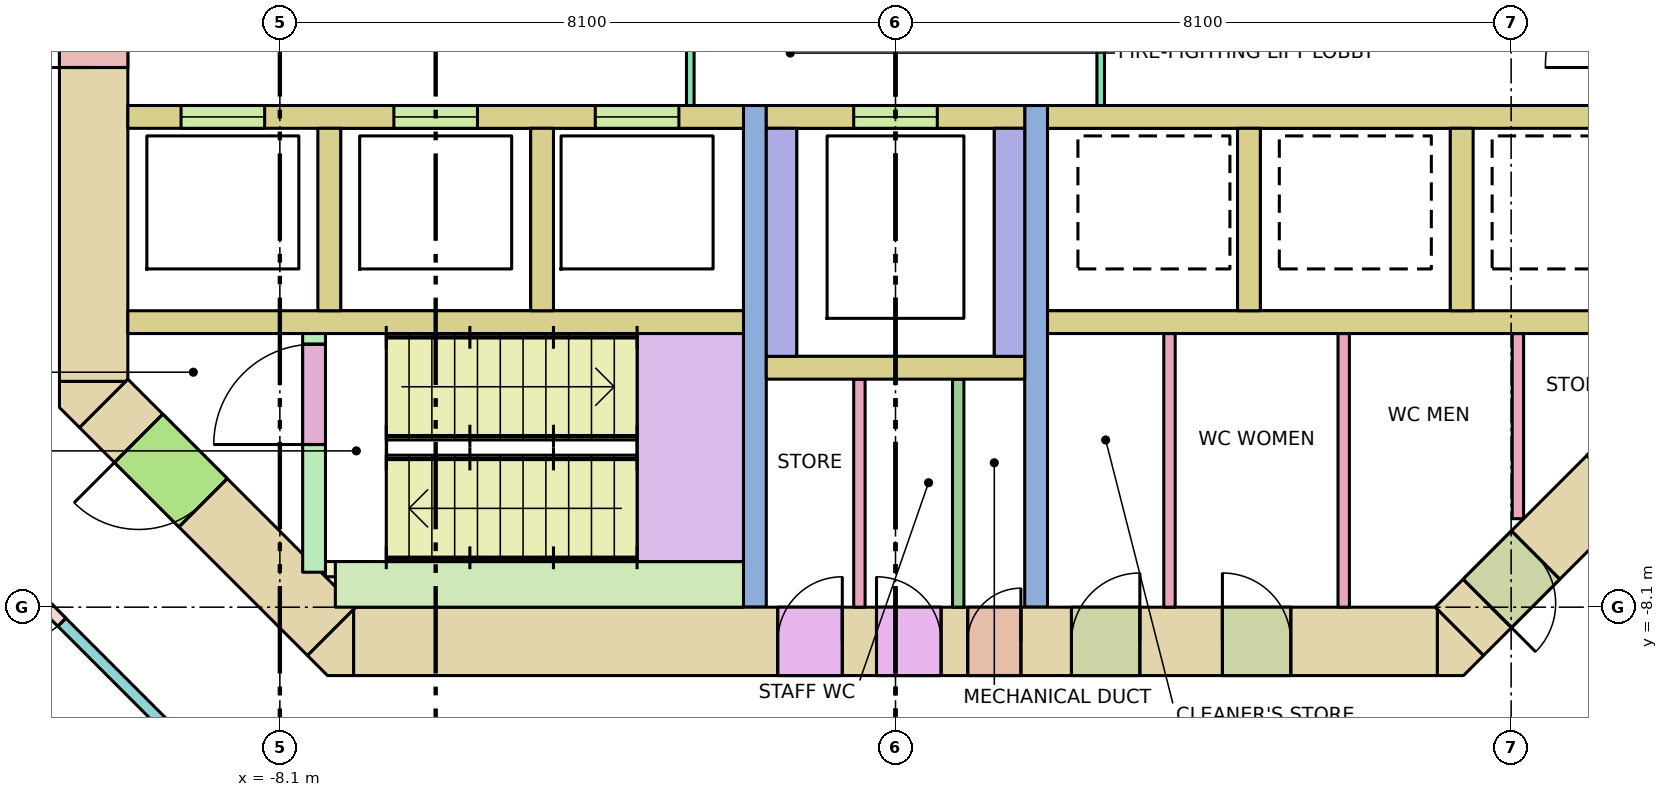
"""IFC4 building model, lengths in metres.
Left out: names, types, materials, properties, quantities, classifications, styles, units other than length and angle.
Written with IfcOpenShell. Run it as: python <this file> out.ifc"""

import sys

from ifc_helpers import new_model, si_unit, direction, frame, frame_2d, origin, place, context, subcontext, project, spatial, polyline, rectangle, outline, extrude, element, fill, save


model = new_model("IFC4")
c1 = context("Model", 3, precision=1e-05, world=origin(), true_north=direction((0.0, 1.0)))
c2 = subcontext(c1, "Body", "Model", "MODEL_VIEW")
j1 = project(units=[si_unit("LENGTHUNIT", "METRE"), si_unit("PLANEANGLEUNIT", "RADIAN")], contexts=[c1])
p1 = place(None, origin())
s1 = spatial("IfcSite", under=j1, at=p1, CompositionType="ELEMENT")
p2 = place(p1, origin())
s2 = spatial("IfcBuilding", under=s1, at=p2, CompositionType="ELEMENT")
p3 = place(p2, frame((0.0, 0.0, 98.6)))
s3 = spatial("IfcBuildingStorey", under=s2, at=p3, CompositionType="ELEMENT", Elevation=98.6)
p4 = place(p3, frame((-7.13, -8.55, -0.28), z_axis=(0.0, 0.0, 1.0), x_axis=(1.0, 0.0, 0.0)))
e1 = element("IfcWall", 1, at=p4, inside=s3, PredefinedType="SHEAR", context=c2, shape_type="SweptSolid", body=[
    extrude(rectangle(XDim=14.26, YDim=0.9, at=frame_2d((7.13, 0.0))), origin(), (0.0, 0.0, 1.0), 4.0),
])
p5 = place(p4, frame((8.08, 0.0, 0.28)))
e2 = element("IfcOpeningElement", 2, at=p5, cuts=e1, PredefinedType="OPENING", context=c2, shape_type="SweptSolid", body=[
    extrude(rectangle(XDim=0.7, YDim=2.1, at=frame_2d((0.35, 1.05))), frame((0.0, 0.46, 0.0), z_axis=(0.0, -1.0, 0.0), x_axis=(1.0, 0.0, 0.0)), (0.0, 0.0, 1.0), 0.92),
])
p6 = place(p4, frame((5.58, 0.0, 0.28)))
e3 = element("IfcOpeningElement", 3, at=p6, cuts=e1, PredefinedType="OPENING", context=c2, shape_type="SweptSolid", body=[
    extrude(rectangle(XDim=0.85, YDim=2.1, at=frame_2d((0.425, 1.05))), frame((0.0, 0.46, 0.0), z_axis=(0.0, -1.0, 0.0), x_axis=(1.0, 0.0, 0.0)), (0.0, 0.0, 1.0), 0.92),
])
p7 = place(p4, frame((6.88, 0.0, 0.28)))
e4 = element("IfcOpeningElement", 4, at=p7, cuts=e1, PredefinedType="OPENING", context=c2, shape_type="SweptSolid", body=[
    extrude(rectangle(XDim=0.85, YDim=2.1, at=frame_2d((0.425, 1.05))), frame((0.0, 0.46, 0.0), z_axis=(0.0, -1.0, 0.0), x_axis=(1.0, 0.0, 0.0)), (0.0, 0.0, 1.0), 0.92),
])
p8 = place(p4, frame((9.445, 0.0, 0.28)))
e5 = element("IfcOpeningElement", 5, at=p8, cuts=e1, PredefinedType="OPENING", context=c2, shape_type="SweptSolid", body=[
    extrude(rectangle(XDim=0.9, YDim=2.1, at=frame_2d((0.45, 1.05))), frame((0.0, 0.46, 0.0), z_axis=(0.0, -1.0, 0.0), x_axis=(1.0, 0.0, 0.0)), (0.0, 0.0, 1.0), 0.92),
])
p9 = place(p4, frame((11.431, 0.0, 0.28)))
e6 = element("IfcOpeningElement", 6, at=p9, cuts=e1, PredefinedType="OPENING", context=c2, shape_type="SweptSolid", body=[
    extrude(rectangle(XDim=0.9, YDim=2.1, at=frame_2d((0.45, 1.05))), frame((0.0, 0.46, 0.0), z_axis=(0.0, -1.0, 0.0), x_axis=(1.0, 0.0, 0.0)), (0.0, 0.0, 1.0), 0.92),
])
p10 = place(p3, frame((-10.55, -5.13, -0.28), z_axis=(0.0, 0.0, 1.0), x_axis=(0.0, 1.0, 0.0)))
e7 = element("IfcWall", 7, at=p10, inside=s3, PredefinedType="SHEAR", context=c2, shape_type="SweptSolid", body=[
    extrude(rectangle(XDim=10.26, YDim=0.9, at=frame_2d((5.13, 0.0))), origin(), (0.0, 0.0, 1.0), 4.0),
])
p11 = place(p10, frame((4.13, 0.0, 0.28)))
e8 = element("IfcOpeningElement", 8, at=p11, cuts=e7, PredefinedType="OPENING", context=c2, shape_type="SweptSolid", body=[
    extrude(rectangle(XDim=2.0, YDim=2.1, at=frame_2d((1.0, 1.05))), frame((0.0, 0.46, 0.0), z_axis=(0.0, -1.0, 0.0), x_axis=(1.0, 0.0, 0.0)), (0.0, 0.0, 1.0), 0.92),
])
p12 = place(p3, frame((10.418, -5.418, -0.28), z_axis=(0.0, 0.0, 1.0), x_axis=(-0.707106781187, -0.707106781187, 0.0)))
e9 = element("IfcWall", 9, at=p12, inside=s3, PredefinedType="SHEAR", context=c2, shape_type="SweptSolid", body=[
    extrude(rectangle(XDim=4.243, YDim=0.9, at=frame_2d((2.121, 0.0))), origin(), (0.0, 0.0, 1.0), 4.0),
])
p13 = place(p12, frame((2.823, 0.0, 0.28)))
e10 = element("IfcOpeningElement", 10, at=p13, cuts=e9, PredefinedType="OPENING", context=c2, shape_type="SweptSolid", body=[
    extrude(rectangle(XDim=0.9, YDim=2.1, at=frame_2d((0.45, 1.05))), frame((0.0, 0.46, 0.0), z_axis=(0.0, -1.0, 0.0), x_axis=(1.0, 0.0, 0.0)), (0.0, 0.0, 1.0), 0.92),
])
p14 = place(p12, frame((0.52, 0.0, 0.28)))
e11 = element("IfcOpeningElement", 11, at=p14, cuts=e9, PredefinedType="OPENING", context=c2, shape_type="SweptSolid", body=[
    extrude(rectangle(XDim=0.9, YDim=2.1, at=frame_2d((0.45, 1.05))), frame((0.0, 0.46, 0.0), z_axis=(0.0, -1.0, 0.0), x_axis=(1.0, 0.0, 0.0)), (0.0, 0.0, 1.0), 0.92),
])
p15 = place(p3, frame((-7.418, -8.418, -0.28), z_axis=(0.0, 0.0, 1.0), x_axis=(-0.707106781187, 0.707106781187, 0.0)))
e12 = element("IfcWall", 12, at=p15, inside=s3, PredefinedType="SHEAR", context=c2, shape_type="SweptSolid", body=[
    extrude(rectangle(XDim=4.243, YDim=0.9, at=frame_2d((2.121, 0.0))), origin(), (0.0, 0.0, 1.0), 4.0),
])
p16 = place(p15, frame((2.393, 0.0, 0.28)))
e13 = element("IfcOpeningElement", 13, at=p16, cuts=e12, PredefinedType="OPENING", context=c2, shape_type="SweptSolid", body=[
    extrude(rectangle(XDim=1.2, YDim=2.1, at=frame_2d((0.6, 1.05))), frame((0.0, 0.46, 0.0), z_axis=(0.0, -1.0, 0.0), x_axis=(1.0, 0.0, 0.0)), (0.0, 0.0, 1.0), 0.92),
])
p17 = place(p3, frame((0.0, 0.0, -0.28)))
e14 = element("IfcWall", 14, at=p17, inside=s3, PredefinedType="SHEAR", context=c2, shape_type="SweptSolid", body=[
    extrude(outline(polyline([(-7.473, -9.0), (-7.736, -8.736), (-7.13, -8.13), (-7.13, -9.0), (-7.473, -9.0)])), origin(), (0.0, 0.0, 1.0), 4.0),
])
p18 = place(p3, frame((0.0, 0.0, -0.28)))
e15 = element("IfcWall", 15, at=p18, inside=s3, PredefinedType="SHEAR", context=c2, shape_type="SweptSolid", body=[
    extrude(outline(polyline([(7.473, -9.0), (7.13, -9.0), (7.13, -8.13), (7.736, -8.736), (7.473, -9.0)])), origin(), (0.0, 0.0, 1.0), 4.0),
])
p19 = place(p3, frame((0.0, 0.0, -0.28)))
e16 = element("IfcWall", 16, at=p19, inside=s3, PredefinedType="SHEAR", context=c2, shape_type="SweptSolid", body=[
    extrude(outline(polyline([(-11.0, -5.473), (-11.0, -5.13), (-10.13, -5.13), (-10.736, -5.736), (-11.0, -5.473)])), origin(), (0.0, 0.0, 1.0), 4.0),
])
for number, where, z_axis, x_axis in (
    (17, (-10.1, -4.35, 0.0), (0.0, 0.0, 1.0), (1.0, 0.0, 0.0)),
    (18, (2.0, -4.35, 0.0), (0.0, 0.0, 1.0), (1.0, 0.0, 0.0)),
):
    element("IfcWall", number, at=place(p3, frame(where, z_axis=z_axis, x_axis=x_axis)), inside=s3, PredefinedType="SOLIDWALL", context=c2, shape_type="SweptSolid", body=[
        extrude(rectangle(XDim=8.1, YDim=0.3, at=frame_2d((4.05, 0.0))), origin(), (0.0, 0.0, 1.0), 3.72),
    ])
p20 = place(p3, frame((-10.1, -1.65, 0.0), z_axis=(0.0, 0.0, 1.0), x_axis=(1.0, 0.0, 0.0)))
e19 = element("IfcWall", 19, at=p20, inside=s3, PredefinedType="SOLIDWALL", context=c2, shape_type="SweptSolid", body=[
    extrude(rectangle(XDim=8.1, YDim=0.3, at=frame_2d((4.05, 0.0))), origin(), (0.0, 0.0, 1.0), 3.72),
])
p21 = place(p20, frame((0.7, 0.0, 0.0)))
e20 = element("IfcOpeningElement", 20, at=p21, cuts=e19, PredefinedType="OPENING", context=c2, shape_type="SweptSolid", body=[
    extrude(rectangle(XDim=1.1, YDim=2.1, at=frame_2d((0.55, 1.05))), frame((0.0, 0.16, 0.0), z_axis=(0.0, -1.0, 0.0), x_axis=(1.0, 0.0, 0.0)), (0.0, 0.0, 1.0), 0.32),
])
p22 = place(p20, frame((3.5, 0.0, 0.0)))
e21 = element("IfcOpeningElement", 21, at=p22, cuts=e19, PredefinedType="OPENING", context=c2, shape_type="SweptSolid", body=[
    extrude(rectangle(XDim=1.1, YDim=2.1, at=frame_2d((0.55, 1.05))), frame((0.0, 0.16, 0.0), z_axis=(0.0, -1.0, 0.0), x_axis=(1.0, 0.0, 0.0)), (0.0, 0.0, 1.0), 0.32),
])
p23 = place(p20, frame((6.15, 0.0, 0.0)))
e22 = element("IfcOpeningElement", 22, at=p23, cuts=e19, PredefinedType="OPENING", context=c2, shape_type="SweptSolid", body=[
    extrude(rectangle(XDim=1.1, YDim=2.1, at=frame_2d((0.55, 1.05))), frame((0.0, 0.16, 0.0), z_axis=(0.0, -1.0, 0.0), x_axis=(1.0, 0.0, 0.0)), (0.0, 0.0, 1.0), 0.32),
])
p24 = place(p3, frame((2.0, -1.65, 0.0), z_axis=(0.0, 0.0, 1.0), x_axis=(1.0, 0.0, 0.0)))
e23 = element("IfcWall", 23, at=p24, inside=s3, PredefinedType="SOLIDWALL", context=c2, shape_type="SweptSolid", body=[
    extrude(rectangle(XDim=8.1, YDim=0.3, at=frame_2d((4.05, 0.0))), origin(), (0.0, 0.0, 1.0), 3.72),
])
for number, where, z_axis, x_axis in (
    (24, (-7.45, -4.2, 0.0), (0.0, 0.0, 1.0), (0.0, 1.0, 0.0)),
    (25, (-4.65, -4.2, 0.0), (0.0, 0.0, 1.0), (0.0, 1.0, 0.0)),
    (26, (4.65, -4.2, 0.0), (0.0, 0.0, 1.0), (0.0, 1.0, 0.0)),
    (27, (7.45, -4.2, 0.0), (0.0, 0.0, 1.0), (0.0, 1.0, 0.0)),
):
    element("IfcWall", number, at=place(p3, frame(where, z_axis=z_axis, x_axis=x_axis)), inside=s3, PredefinedType="SOLIDWALL", context=c2, shape_type="SweptSolid", body=[
        extrude(rectangle(XDim=2.4, YDim=0.3, at=frame_2d((1.2, 0.0))), origin(), (0.0, 0.0, 1.0), 3.72),
    ])
for number, where, z_axis, x_axis in (
    (28, (-1.85, -8.1, 0.0), (0.0, 0.0, 1.0), (0.0, 1.0, 0.0)),
    (29, (1.85, -8.1, 0.0), (0.0, 0.0, 1.0), (0.0, 1.0, 0.0)),
):
    element("IfcWall", number, at=place(p3, frame(where, z_axis=z_axis, x_axis=x_axis)), inside=s3, PredefinedType="SHEAR", context=c2, shape_type="SweptSolid", body=[
        extrude(rectangle(XDim=6.6, YDim=0.3, at=frame_2d((3.3, 0.0))), origin(), (0.0, 0.0, 1.0), 3.72),
    ])
p25 = place(p3, frame((-1.7, -1.65, 0.0), z_axis=(0.0, 0.0, 1.0), x_axis=(1.0, 0.0, 0.0)))
e30 = element("IfcWall", 30, at=p25, inside=s3, PredefinedType="SOLIDWALL", context=c2, shape_type="SweptSolid", body=[
    extrude(rectangle(XDim=3.4, YDim=0.3, at=frame_2d((1.7, 0.0))), origin(), (0.0, 0.0, 1.0), 3.72),
])
p26 = place(p25, frame((1.15, 0.0, 0.0)))
e31 = element("IfcOpeningElement", 31, at=p26, cuts=e30, PredefinedType="OPENING", context=c2, shape_type="SweptSolid", body=[
    extrude(rectangle(XDim=1.1, YDim=2.1, at=frame_2d((0.55, 1.05))), frame((0.0, 0.16, 0.0), z_axis=(0.0, -1.0, 0.0), x_axis=(1.0, 0.0, 0.0)), (0.0, 0.0, 1.0), 0.32),
])
for number, where, z_axis, x_axis in (
    (32, (-1.5, -4.8, 0.0), (0.0, 0.0, 1.0), (0.0, 1.0, 0.0)),
    (33, (1.5, -4.8, 0.0), (0.0, 0.0, 1.0), (0.0, 1.0, 0.0)),
):
    element("IfcWall", number, at=place(p3, frame(where, z_axis=z_axis, x_axis=x_axis)), inside=s3, PredefinedType="SOLIDWALL", context=c2, shape_type="SweptSolid", body=[
        extrude(rectangle(XDim=3.0, YDim=0.4, at=frame_2d((1.5, 0.0))), origin(), (0.0, 0.0, 1.0), 3.72),
    ])
p27 = place(p3, frame((-1.7, -4.95, 0.0), z_axis=(0.0, 0.0, 1.0), x_axis=(1.0, 0.0, 0.0)))
e34 = element("IfcWall", 34, at=p27, inside=s3, PredefinedType="SOLIDWALL", context=c2, shape_type="SweptSolid", body=[
    extrude(rectangle(XDim=3.4, YDim=0.3, at=frame_2d((1.7, 0.0))), origin(), (0.0, 0.0, 1.0), 3.72),
])
p28 = place(p3, frame((-7.65, -7.64, 0.0), z_axis=(0.0, 0.0, 1.0), x_axis=(0.0, 1.0, 0.0)))
e35 = element("IfcWall", 35, at=p28, inside=s3, PredefinedType="SHEAR", context=c2, shape_type="SweptSolid", body=[
    extrude(rectangle(XDim=3.14, YDim=0.3, at=frame_2d((1.57, 0.0))), origin(), (0.0, 0.0, 1.0), 3.72),
])
p29 = place(p28, frame((1.68, 0.0, 0.0)))
e36 = element("IfcOpeningElement", 36, at=p29, cuts=e35, PredefinedType="OPENING", context=c2, shape_type="SweptSolid", body=[
    extrude(rectangle(XDim=1.32, YDim=2.1, at=frame_2d((0.66, 1.05))), frame((0.0, 0.16, 0.0), z_axis=(0.0, -1.0, 0.0), x_axis=(1.0, 0.0, 0.0)), (0.0, 0.0, 1.0), 0.32),
])
p30 = place(p3, frame((-7.5, -7.6, 0.0), z_axis=(0.0, 0.0, 1.0), x_axis=(1.0, 0.0, 0.0)))
e37 = element("IfcWall", 37, at=p30, inside=s3, PredefinedType="SHEAR", context=c2, shape_type="SweptSolid", body=[
    extrude(rectangle(XDim=0.6, YDim=0.2, at=frame_2d((0.3, 0.0))), origin(), (0.0, 0.0, 1.0), 3.72),
])
p31 = place(p3, frame((-7.37, -7.8, 0.0), z_axis=(0.0, 0.0, 1.0), x_axis=(1.0, 0.0, 0.0)))
e38 = element("IfcWall", 38, at=p31, inside=s3, PredefinedType="SHEAR", context=c2, shape_type="SweptSolid", body=[
    extrude(rectangle(XDim=5.37, YDim=0.6, at=frame_2d((2.685, 0.0))), origin(), (0.0, 0.0, 1.0), 3.72),
])
p32 = place(p3, frame((-2.7, -1.5, 0.0), z_axis=(0.0, 0.0, 1.0), x_axis=(0.0, 1.0, 0.0)))
e39 = element("IfcWall", 39, at=p32, inside=s3, PredefinedType="PARTITIONING", context=c2, shape_type="SweptSolid", body=[
    extrude(rectangle(XDim=3.0, YDim=0.1, at=frame_2d((1.5, 0.0))), origin(), (0.0, 0.0, 1.0), 3.72),
])
p33 = place(p32, frame((0.9, 0.0, 0.0)))
e40 = element("IfcOpeningElement", 40, at=p33, cuts=e39, PredefinedType="OPENING", context=c2, shape_type="SweptSolid", body=[
    extrude(rectangle(XDim=1.2, YDim=2.1, at=frame_2d((0.6, 1.05))), frame((0.0, 0.06, 0.0), z_axis=(0.0, -1.0, 0.0), x_axis=(1.0, 0.0, 0.0)), (0.0, 0.0, 1.0), 0.12),
])
p34 = place(p3, frame((2.7, -1.5, 0.0), z_axis=(0.0, 0.0, 1.0), x_axis=(0.0, 1.0, 0.0)))
e41 = element("IfcWall", 41, at=p34, inside=s3, PredefinedType="PARTITIONING", context=c2, shape_type="SweptSolid", body=[
    extrude(rectangle(XDim=3.0, YDim=0.1, at=frame_2d((1.5, 0.0))), origin(), (0.0, 0.0, 1.0), 3.72),
])
p35 = place(p34, frame((0.9, 0.0, 0.0)))
e42 = element("IfcOpeningElement", 42, at=p35, cuts=e41, PredefinedType="OPENING", context=c2, shape_type="SweptSolid", body=[
    extrude(rectangle(XDim=1.2, YDim=2.1, at=frame_2d((0.6, 1.05))), frame((0.0, 0.06, 0.0), z_axis=(0.0, -1.0, 0.0), x_axis=(1.0, 0.0, 0.0)), (0.0, 0.0, 1.0), 0.12),
])
for number, where, z_axis, x_axis in (
    (43, (0.825, -8.1, 0.0), (0.0, 0.0, 1.0), (0.0, 1.0, 0.0)),
    (44, (-0.475, -8.1, 0.0), (0.0, 0.0, 1.0), (0.0, 1.0, 0.0)),
):
    element("IfcWall", number, at=place(p3, frame(where, z_axis=z_axis, x_axis=x_axis)), inside=s3, PredefinedType="PARTITIONING", context=c2, shape_type="SweptSolid", body=[
        extrude(rectangle(XDim=3.0, YDim=0.15, at=frame_2d((1.5, 0.0))), origin(), (0.0, 0.0, 1.0), 3.72),
    ])
for number, where, z_axis, x_axis in (
    (45, (3.605, -8.1, 0.0), (0.0, 0.0, 1.0), (0.0, 1.0, 0.0)),
    (46, (5.897, -8.1, 0.0), (0.0, 0.0, 1.0), (0.0, 1.0, 0.0)),
):
    element("IfcWall", number, at=place(p3, frame(where, z_axis=z_axis, x_axis=x_axis)), inside=s3, PredefinedType="PARTITIONING", context=c2, shape_type="SweptSolid", body=[
        extrude(rectangle(XDim=3.6, YDim=0.15, at=frame_2d((1.8, 0.0))), origin(), (0.0, 0.0, 1.0), 3.72),
    ])
p36 = place(p3, frame((8.189, -6.936, 0.0), z_axis=(0.0, 0.0, 1.0), x_axis=(0.0, 1.0, 0.0)))
e47 = element("IfcWall", 47, at=p36, inside=s3, PredefinedType="PARTITIONING", context=c2, shape_type="SweptSolid", body=[
    extrude(rectangle(XDim=2.436, YDim=0.15, at=frame_2d((1.218, 0.0))), origin(), (0.0, 0.0, 1.0), 3.72),
])
p37 = place(p3, frame((-8.291, -10.975, 0.0), z_axis=(0.0, 0.0, 1.0), x_axis=(-0.707106781187, 0.707106781187, 0.0)))
e48 = element("IfcWall", 48, at=p37, inside=s3, PredefinedType="PARTITIONING", context=c2, shape_type="SweptSolid", body=[
    extrude(rectangle(XDim=6.624, YDim=0.15, at=frame_2d((3.312, 0.0))), origin(), (0.0, 0.0, 1.0), 2.82),
])
p38 = place(p37, frame((3.786, 0.0, 0.0)))
e49 = element("IfcOpeningElement", 49, at=p38, cuts=e48, PredefinedType="OPENING", context=c2, shape_type="SweptSolid", body=[
    extrude(rectangle(XDim=0.9, YDim=2.1, at=frame_2d((0.45, 1.05))), frame((0.0, 0.085, 0.0), z_axis=(0.0, -1.0, 0.0), x_axis=(1.0, 0.0, 0.0)), (0.0, 0.0, 1.0), 0.17),
])
p39 = place(p3, frame((12.975, -6.291, 0.0), z_axis=(0.0, 0.0, 1.0), x_axis=(-0.707125355289, -0.707088206597, 0.0)))
e50 = element("IfcWall", 50, at=p39, inside=s3, PredefinedType="PARTITIONING", context=c2, shape_type="SweptSolid", body=[
    extrude(rectangle(XDim=6.572, YDim=0.15, at=frame_2d((3.286, 0.0))), origin(), (0.0, 0.0, 1.0), 2.82),
])
p40 = place(p21, origin())
e51 = element("IfcDoor", 51, at=p40, inside=s3, OperationType="DOUBLE_DOOR_SLIDING", PredefinedType="DOOR", context=c2, shape_type="SweptSolid", body=[
    extrude(rectangle(XDim=1.1, YDim=2.1, at=frame_2d((0.55, 1.05))), frame((0.0, 0.025, 0.0), z_axis=(0.0, -1.0, 0.0), x_axis=(1.0, 0.0, 0.0)), (0.0, 0.0, 1.0), 0.05),
])
fill(e20, e51)
p41 = place(p22, origin())
e52 = element("IfcDoor", 52, at=p41, inside=s3, OperationType="DOUBLE_DOOR_SLIDING", PredefinedType="DOOR", context=c2, shape_type="SweptSolid", body=[
    extrude(rectangle(XDim=1.1, YDim=2.1, at=frame_2d((0.55, 1.05))), frame((0.0, 0.025, 0.0), z_axis=(0.0, -1.0, 0.0), x_axis=(1.0, 0.0, 0.0)), (0.0, 0.0, 1.0), 0.05),
])
fill(e21, e52)
p42 = place(p23, origin())
e53 = element("IfcDoor", 53, at=p42, inside=s3, OperationType="DOUBLE_DOOR_SLIDING", PredefinedType="DOOR", context=c2, shape_type="SweptSolid", body=[
    extrude(rectangle(XDim=1.1, YDim=2.1, at=frame_2d((0.55, 1.05))), frame((0.0, 0.025, 0.0), z_axis=(0.0, -1.0, 0.0), x_axis=(1.0, 0.0, 0.0)), (0.0, 0.0, 1.0), 0.05),
])
fill(e22, e53)
p43 = place(p26, origin())
e54 = element("IfcDoor", 54, at=p43, inside=s3, OperationType="DOUBLE_DOOR_SLIDING", PredefinedType="DOOR", context=c2, shape_type="SweptSolid", body=[
    extrude(rectangle(XDim=1.1, YDim=2.1, at=frame_2d((0.55, 1.05))), frame((0.0, 0.025, 0.0), z_axis=(0.0, -1.0, 0.0), x_axis=(1.0, 0.0, 0.0)), (0.0, 0.0, 1.0), 0.05),
])
fill(e31, e54)
p44 = place(p29, origin())
e55 = element("IfcDoor", 55, at=p44, inside=s3, OperationType="DOUBLE_DOOR_SINGLE_SWING", PredefinedType="DOOR", context=c2, shape_type="SweptSolid", body=[
    extrude(rectangle(XDim=1.32, YDim=2.1, at=frame_2d((0.66, 1.05))), frame((0.0, 0.025, 0.0), z_axis=(0.0, -1.0, 0.0), x_axis=(1.0, 0.0, 0.0)), (0.0, 0.0, 1.0), 0.05),
])
fill(e36, e55)
p45 = place(p16, origin())
e56 = element("IfcDoor", 56, at=p45, inside=s3, OperationType="SINGLE_SWING_RIGHT", PredefinedType="DOOR", context=c2, shape_type="SweptSolid", body=[
    extrude(rectangle(XDim=1.2, YDim=2.1, at=frame_2d((0.6, 1.05))), frame((0.0, 0.025, 0.0), z_axis=(0.0, -1.0, 0.0), x_axis=(1.0, 0.0, 0.0)), (0.0, 0.0, 1.0), 0.05),
])
fill(e13, e56)
p46 = place(p11, origin())
e57 = element("IfcDoor", 57, at=p46, inside=s3, OperationType="DOUBLE_DOOR_SINGLE_SWING", PredefinedType="DOOR", context=c2, shape_type="SweptSolid", body=[
    extrude(rectangle(XDim=2.0, YDim=2.1, at=frame_2d((1.0, 1.05))), frame((0.0, 0.025, 0.0), z_axis=(0.0, -1.0, 0.0), x_axis=(1.0, 0.0, 0.0)), (0.0, 0.0, 1.0), 0.05),
])
fill(e8, e57)
p47 = place(p5, origin())
e58 = element("IfcDoor", 58, at=p47, inside=s3, OperationType="SINGLE_SWING_RIGHT", PredefinedType="DOOR", context=c2, shape_type="SweptSolid", body=[
    extrude(rectangle(XDim=0.7, YDim=2.1, at=frame_2d((0.35, 1.05))), frame((0.0, 0.025, 0.0), z_axis=(0.0, -1.0, 0.0), x_axis=(1.0, 0.0, 0.0)), (0.0, 0.0, 1.0), 0.05),
])
fill(e2, e58)
p48 = place(p6, origin())
e59 = element("IfcDoor", 59, at=p48, inside=s3, OperationType="SINGLE_SWING_RIGHT", PredefinedType="DOOR", context=c2, shape_type="SweptSolid", body=[
    extrude(rectangle(XDim=0.85, YDim=2.1, at=frame_2d((0.425, 1.05))), frame((0.0, 0.025, 0.0), z_axis=(0.0, -1.0, 0.0), x_axis=(1.0, 0.0, 0.0)), (0.0, 0.0, 1.0), 0.05),
])
fill(e3, e59)
p49 = place(p7, origin())
e60 = element("IfcDoor", 60, at=p49, inside=s3, OperationType="SINGLE_SWING_LEFT", PredefinedType="DOOR", context=c2, shape_type="SweptSolid", body=[
    extrude(rectangle(XDim=0.85, YDim=2.1, at=frame_2d((0.425, 1.05))), frame((0.0, 0.025, 0.0), z_axis=(0.0, -1.0, 0.0), x_axis=(1.0, 0.0, 0.0)), (0.0, 0.0, 1.0), 0.05),
])
fill(e4, e60)
p50 = place(p8, origin())
e61 = element("IfcDoor", 61, at=p50, inside=s3, OperationType="SINGLE_SWING_RIGHT", PredefinedType="DOOR", context=c2, shape_type="SweptSolid", body=[
    extrude(rectangle(XDim=0.9, YDim=2.1, at=frame_2d((0.45, 1.05))), frame((0.0, 0.025, 0.0), z_axis=(0.0, -1.0, 0.0), x_axis=(1.0, 0.0, 0.0)), (0.0, 0.0, 1.0), 0.05),
])
fill(e5, e61)
p51 = place(p9, origin())
e62 = element("IfcDoor", 62, at=p51, inside=s3, OperationType="SINGLE_SWING_LEFT", PredefinedType="DOOR", context=c2, shape_type="SweptSolid", body=[
    extrude(rectangle(XDim=0.9, YDim=2.1, at=frame_2d((0.45, 1.05))), frame((0.0, 0.025, 0.0), z_axis=(0.0, -1.0, 0.0), x_axis=(1.0, 0.0, 0.0)), (0.0, 0.0, 1.0), 0.05),
])
fill(e6, e62)
p52 = place(p13, origin())
e63 = element("IfcDoor", 63, at=p52, inside=s3, OperationType="SINGLE_SWING_RIGHT", PredefinedType="DOOR", context=c2, shape_type="SweptSolid", body=[
    extrude(rectangle(XDim=0.9, YDim=2.1, at=frame_2d((0.45, 1.05))), frame((0.0, 0.025, 0.0), z_axis=(0.0, -1.0, 0.0), x_axis=(1.0, 0.0, 0.0)), (0.0, 0.0, 1.0), 0.05),
])
fill(e10, e63)
p53 = place(p38, origin())
e64 = element("IfcDoor", 64, at=p53, inside=s3, OperationType="SINGLE_SWING_RIGHT", PredefinedType="DOOR", context=c2, shape_type="SweptSolid", body=[
    extrude(rectangle(XDim=0.9, YDim=2.1, at=frame_2d((0.45, 1.05))), frame((0.0, 0.025, 0.0), z_axis=(0.0, -1.0, 0.0), x_axis=(1.0, 0.0, 0.0)), (0.0, 0.0, 1.0), 0.05),
])
fill(e49, e64)
save(model, sys.argv[1])
